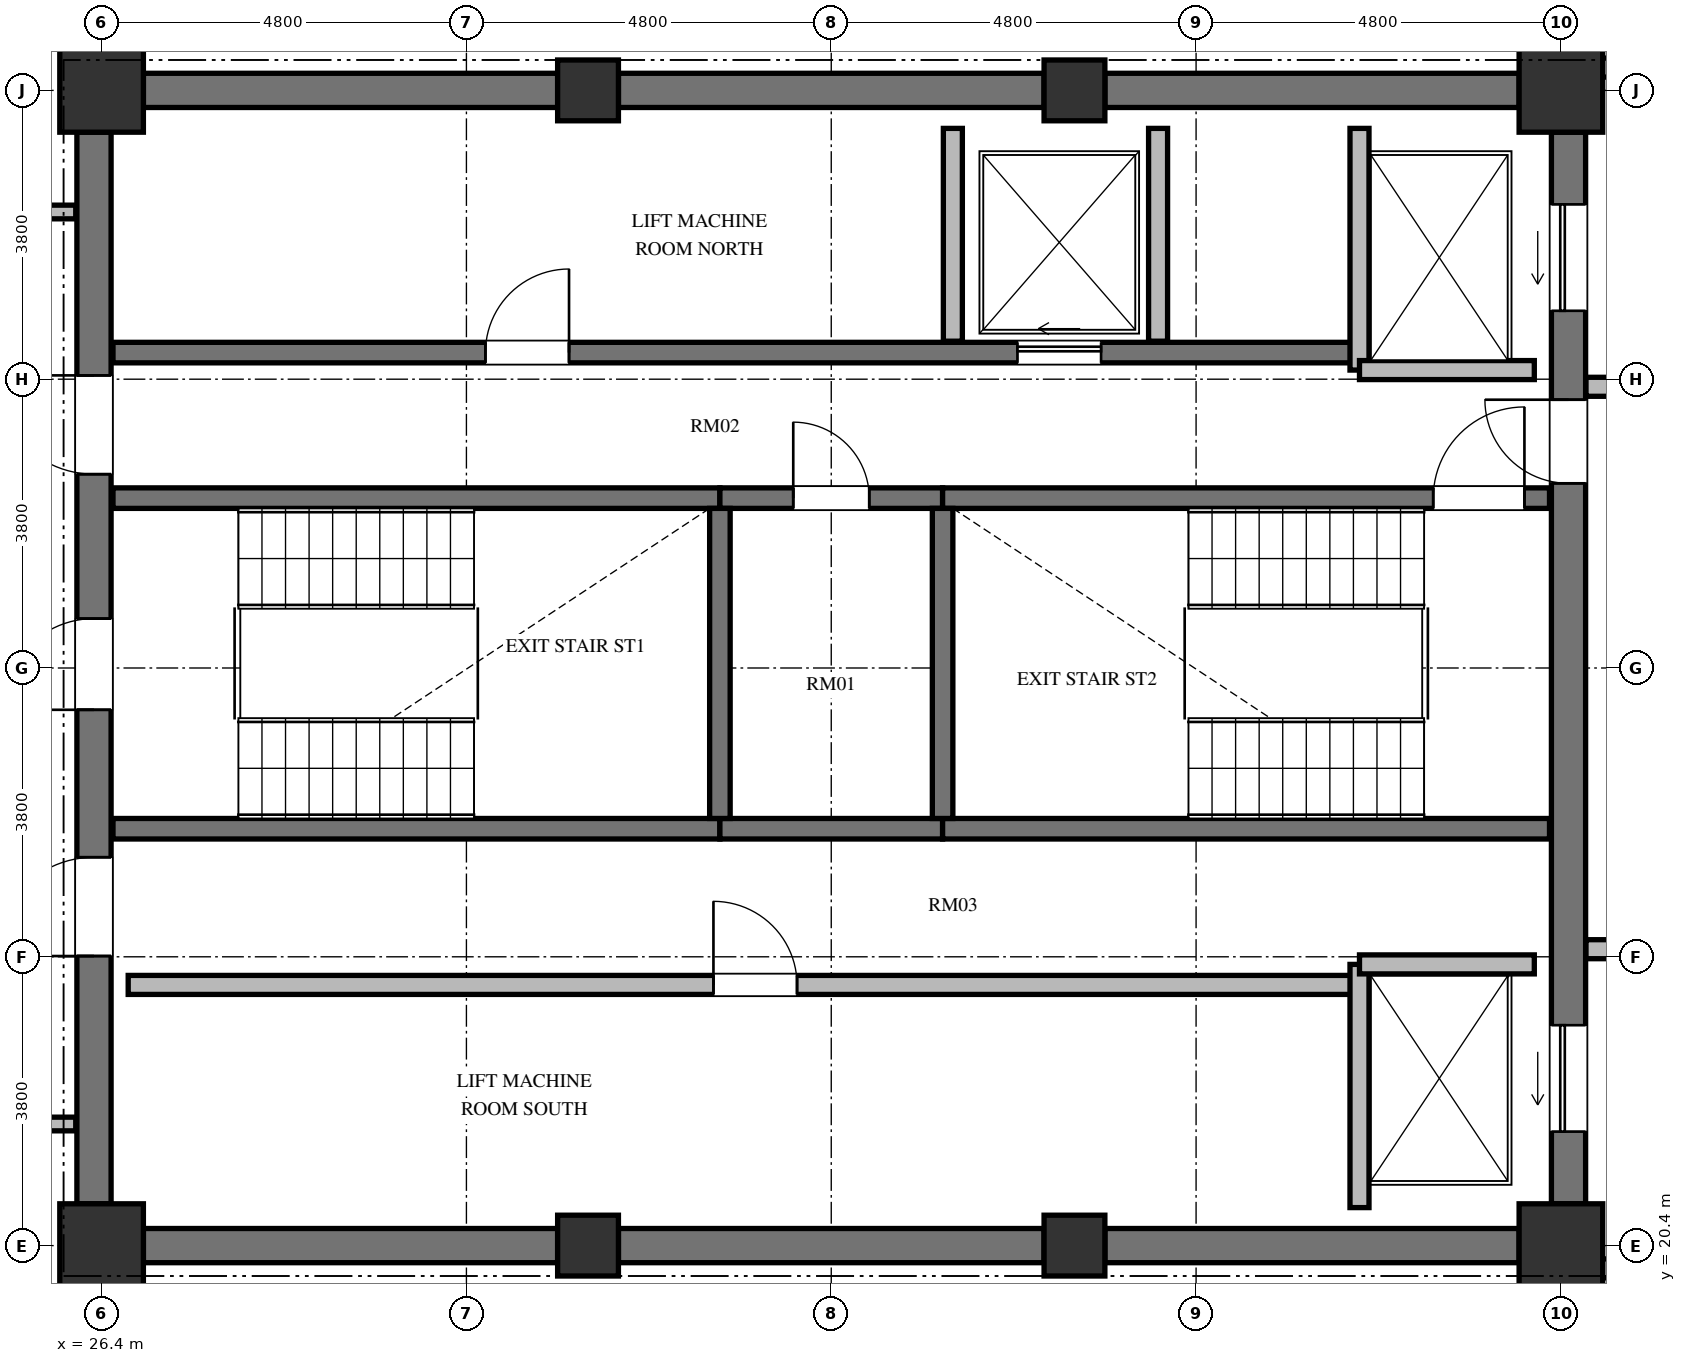
"""IFC4 building model, lengths in metres.
Left out: names, types, materials, properties, quantities, classifications, styles, units other than length and angle.
Written with IfcOpenShell. Run it as: python <this file> out.ifc"""

import sys

from ifc_helpers import new_model, si_unit, direction, frame, frame_2d, origin, origin_2d, place, context, subcontext, project, spatial, rectangle, extrude, element, fill, save


model = new_model("IFC4")
c1 = context("Model", 3, precision=1e-05, world=origin(), true_north=direction((0.0, 1.0)))
c2 = subcontext(c1, "Body", "Model", "MODEL_VIEW")
j1 = project(units=[si_unit("LENGTHUNIT", "METRE"), si_unit("PLANEANGLEUNIT", "RADIAN")], contexts=[c1])
p1 = place(None, origin())
s1 = spatial("IfcSite", under=j1, at=p1, CompositionType="ELEMENT")
p2 = place(p1, origin())
s2 = spatial("IfcBuilding", under=s1, at=p2, CompositionType="ELEMENT")
p3 = place(p2, frame((0.0, 0.0, 309.224)))
s3 = spatial("IfcBuildingStorey", under=s2, at=p3, CompositionType="ELEMENT", Elevation=309.224)
p4 = place(p3, frame((26.4, 20.4, 0.0), z_axis=(0.0, 0.0, 1.0), x_axis=(1.0, 0.0, 0.0)))
e1 = element("IfcColumn", 1, at=p4, inside=s3, PredefinedType="COLUMN", context=c2, shape_type="SweptSolid", body=[
    extrude(rectangle(XDim=1.1, YDim=1.1, at=origin_2d()), origin(), (0.0, 0.0, 1.0), 3.388),
])
for number, where, z_axis, x_axis in (
    (2, (32.8, 20.4, 0.0), (0.0, 0.0, 1.0), (1.0, 0.0, 0.0)),
    (3, (39.2, 20.4, 0.0), (0.0, 0.0, 1.0), (1.0, 0.0, 0.0)),
):
    element("IfcColumn", number, at=place(p3, frame(where, z_axis=z_axis, x_axis=x_axis)), inside=s3, PredefinedType="COLUMN", context=c2, shape_type="SweptSolid", body=[
        extrude(rectangle(XDim=0.8, YDim=0.8, at=origin_2d()), origin(), (0.0, 0.0, 1.0), 3.388),
    ])
for number, where, z_axis, x_axis in (
    (4, (45.6, 20.4, 0.0), (0.0, 0.0, 1.0), (1.0, 0.0, 0.0)),
    (5, (45.6, 35.6, 0.0), (0.0, 0.0, 1.0), (1.0, 0.0, 0.0)),
):
    element("IfcColumn", number, at=place(p3, frame(where, z_axis=z_axis, x_axis=x_axis)), inside=s3, PredefinedType="COLUMN", context=c2, shape_type="SweptSolid", body=[
        extrude(rectangle(XDim=1.1, YDim=1.1, at=origin_2d()), origin(), (0.0, 0.0, 1.0), 3.388),
    ])
for number, where, z_axis, x_axis in (
    (6, (39.2, 35.6, 0.0), (0.0, 0.0, 1.0), (1.0, 0.0, 0.0)),
    (7, (32.8, 35.6, 0.0), (0.0, 0.0, 1.0), (1.0, 0.0, 0.0)),
):
    element("IfcColumn", number, at=place(p3, frame(where, z_axis=z_axis, x_axis=x_axis)), inside=s3, PredefinedType="COLUMN", context=c2, shape_type="SweptSolid", body=[
        extrude(rectangle(XDim=0.8, YDim=0.8, at=origin_2d()), origin(), (0.0, 0.0, 1.0), 3.388),
    ])
p5 = place(p3, frame((26.4, 35.6, 0.0), z_axis=(0.0, 0.0, 1.0), x_axis=(1.0, 0.0, 0.0)))
e8 = element("IfcColumn", 8, at=p5, inside=s3, PredefinedType="COLUMN", context=c2, shape_type="SweptSolid", body=[
    extrude(rectangle(XDim=1.1, YDim=1.1, at=origin_2d()), origin(), (0.0, 0.0, 1.0), 3.388),
])
p6 = place(p3, frame((26.3, 20.95, 0.0), z_axis=(0.0, 0.0, 1.0), x_axis=(0.0, 1.0, 0.0)))
e9 = element("IfcWall", 9, at=p6, inside=s3, PredefinedType="SHEAR", context=c2, shape_type="SweptSolid", body=[
    extrude(rectangle(XDim=14.1, YDim=0.45, at=frame_2d((7.05, 0.0))), origin(), (0.0, 0.0, 1.0), 3.388),
])
p7 = place(p6, frame((6.5, 0.0, 0.0)))
e10 = element("IfcOpeningElement", 10, at=p7, cuts=e9, PredefinedType="OPENING", context=c2, shape_type="SweptSolid", body=[
    extrude(rectangle(XDim=1.2, YDim=2.15, at=frame_2d((0.6, 1.075))), frame((0.0, 0.235, 0.0), z_axis=(0.0, -1.0, 0.0), x_axis=(1.0, 0.0, 0.0)), (0.0, 0.0, 1.0), 0.47),
])
p8 = place(p6, frame((9.6, 0.0, 0.0)))
e11 = element("IfcOpeningElement", 11, at=p8, cuts=e9, PredefinedType="OPENING", context=c2, shape_type="SweptSolid", body=[
    extrude(rectangle(XDim=1.3, YDim=2.2, at=frame_2d((0.65, 1.1))), frame((0.0, 0.235, 0.0), z_axis=(0.0, -1.0, 0.0), x_axis=(1.0, 0.0, 0.0)), (0.0, 0.0, 1.0), 0.47),
])
p9 = place(p6, frame((3.26, 0.0, 0.0)))
e12 = element("IfcOpeningElement", 12, at=p9, cuts=e9, PredefinedType="OPENING", context=c2, shape_type="SweptSolid", body=[
    extrude(rectangle(XDim=1.3, YDim=2.2, at=frame_2d((0.65, 1.1))), frame((0.0, 0.235, 0.0), z_axis=(0.0, -1.0, 0.0), x_axis=(1.0, 0.0, 0.0)), (0.0, 0.0, 1.0), 0.47),
])
p10 = place(p3, frame((45.7, 20.95, 0.0), z_axis=(0.0, 0.0, 1.0), x_axis=(0.0, 1.0, 0.0)))
e13 = element("IfcWall", 13, at=p10, inside=s3, PredefinedType="SHEAR", context=c2, shape_type="SweptSolid", body=[
    extrude(rectangle(XDim=14.1, YDim=0.45, at=frame_2d((7.05, 0.0))), origin(), (0.0, 0.0, 1.0), 3.388),
])
p11 = place(p10, frame((11.75, 0.0, 0.0)))
e14 = element("IfcOpeningElement", 14, at=p11, cuts=e13, PredefinedType="OPENING", context=c2, shape_type="SweptSolid", body=[
    extrude(rectangle(XDim=1.4, YDim=2.3, at=frame_2d((0.7, 1.15))), frame((0.0, 0.235, 0.0), z_axis=(0.0, -1.0, 0.0), x_axis=(1.0, 0.0, 0.0)), (0.0, 0.0, 1.0), 0.47),
])
p12 = place(p10, frame((0.95, 0.0, 0.0)))
e15 = element("IfcOpeningElement", 15, at=p12, cuts=e13, PredefinedType="OPENING", context=c2, shape_type="SweptSolid", body=[
    extrude(rectangle(XDim=1.4, YDim=2.3, at=frame_2d((0.7, 1.15))), frame((0.0, 0.235, 0.0), z_axis=(0.0, -1.0, 0.0), x_axis=(1.0, 0.0, 0.0)), (0.0, 0.0, 1.0), 0.47),
])
p13 = place(p10, frame((9.48, 0.0, 0.0)))
e16 = element("IfcOpeningElement", 16, at=p13, cuts=e13, PredefinedType="OPENING", context=c2, shape_type="SweptSolid", body=[
    extrude(rectangle(XDim=1.1, YDim=2.15, at=frame_2d((0.55, 1.075))), frame((0.0, 0.235, 0.0), z_axis=(0.0, -1.0, 0.0), x_axis=(1.0, 0.0, 0.0)), (0.0, 0.0, 1.0), 0.47),
])
for number, where, z_axis, x_axis in (
    (17, (26.95, 20.4, 0.0), (0.0, 0.0, 1.0), (1.0, 0.0, 0.0)),
    (18, (26.95, 35.6, 0.0), (0.0, 0.0, 1.0), (1.0, 0.0, 0.0)),
):
    element("IfcWall", number, at=place(p3, frame(where, z_axis=z_axis, x_axis=x_axis)), inside=s3, PredefinedType="SHEAR", context=c2, shape_type="SweptSolid", body=[
        extrude(rectangle(XDim=5.45, YDim=0.45, at=frame_2d((2.725, 0.0))), origin(), (0.0, 0.0, 1.0), 3.388),
    ])
for number, where, z_axis, x_axis in (
    (19, (33.2, 20.4, 0.0), (0.0, 0.0, 1.0), (1.0, 0.0, 0.0)),
    (20, (33.2, 35.6, 0.0), (0.0, 0.0, 1.0), (1.0, 0.0, 0.0)),
):
    element("IfcWall", number, at=place(p3, frame(where, z_axis=z_axis, x_axis=x_axis)), inside=s3, PredefinedType="SHEAR", context=c2, shape_type="SweptSolid", body=[
        extrude(rectangle(XDim=5.6, YDim=0.45, at=frame_2d((2.8, 0.0))), origin(), (0.0, 0.0, 1.0), 3.388),
    ])
for number, where, z_axis, x_axis in (
    (21, (39.6, 20.4, 0.0), (0.0, 0.0, 1.0), (1.0, 0.0, 0.0)),
    (22, (39.6, 35.6, 0.0), (0.0, 0.0, 1.0), (1.0, 0.0, 0.0)),
):
    element("IfcWall", number, at=place(p3, frame(where, z_axis=z_axis, x_axis=x_axis)), inside=s3, PredefinedType="SHEAR", context=c2, shape_type="SweptSolid", body=[
        extrude(rectangle(XDim=5.45, YDim=0.45, at=frame_2d((2.725, 0.0))), origin(), (0.0, 0.0, 1.0), 3.388),
    ])
p14 = place(p3, frame((26.55, 30.235, 0.0), z_axis=(0.0, 0.0, 1.0), x_axis=(1.0, 0.0, 0.0)))
e23 = element("IfcWall", 23, at=p14, inside=s3, PredefinedType="SHEAR", context=c2, shape_type="SweptSolid", body=[
    extrude(rectangle(XDim=7.985, YDim=0.27, at=frame_2d((3.992, 0.0))), origin(), (0.0, 0.0, 1.0), 3.388),
])
p15 = place(p3, frame((34.535, 30.235, 0.0), z_axis=(0.0, 0.0, 1.0), x_axis=(1.0, 0.0, 0.0)))
e24 = element("IfcWall", 24, at=p15, inside=s3, PredefinedType="SHEAR", context=c2, shape_type="SweptSolid", body=[
    extrude(rectangle(XDim=2.93, YDim=0.27, at=frame_2d((1.465, 0.0))), origin(), (0.0, 0.0, 1.0), 3.388),
])
p16 = place(p15, frame((0.965, 0.0, 0.0)))
e25 = element("IfcOpeningElement", 25, at=p16, cuts=e24, PredefinedType="OPENING", context=c2, shape_type="SweptSolid", body=[
    extrude(rectangle(XDim=1.0, YDim=2.1, at=frame_2d((0.5, 1.05))), frame((0.0, 0.145, 0.0), z_axis=(0.0, -1.0, 0.0), x_axis=(1.0, 0.0, 0.0)), (0.0, 0.0, 1.0), 0.29),
])
p17 = place(p3, frame((37.465, 30.235, 0.0), z_axis=(0.0, 0.0, 1.0), x_axis=(1.0, 0.0, 0.0)))
e26 = element("IfcWall", 26, at=p17, inside=s3, PredefinedType="SHEAR", context=c2, shape_type="SweptSolid", body=[
    extrude(rectangle(XDim=7.985, YDim=0.27, at=frame_2d((3.992, 0.0))), origin(), (0.0, 0.0, 1.0), 3.388),
])
p18 = place(p17, frame((6.455, 0.0, 0.0)))
e27 = element("IfcOpeningElement", 27, at=p18, cuts=e26, PredefinedType="OPENING", context=c2, shape_type="SweptSolid", body=[
    extrude(rectangle(XDim=1.2, YDim=2.15, at=frame_2d((0.6, 1.075))), frame((0.0, 0.145, 0.0), z_axis=(0.0, -1.0, 0.0), x_axis=(1.0, 0.0, 0.0)), (0.0, 0.0, 1.0), 0.29),
])
p19 = place(p3, frame((26.55, 25.885, 0.0), z_axis=(0.0, 0.0, 1.0), x_axis=(1.0, 0.0, 0.0)))
e28 = element("IfcWall", 28, at=p19, inside=s3, PredefinedType="SHEAR", context=c2, shape_type="SweptSolid", body=[
    extrude(rectangle(XDim=7.985, YDim=0.27, at=frame_2d((3.992, 0.0))), origin(), (0.0, 0.0, 1.0), 3.388),
])
p20 = place(p3, frame((34.535, 25.885, 0.0), z_axis=(0.0, 0.0, 1.0), x_axis=(1.0, 0.0, 0.0)))
e29 = element("IfcWall", 29, at=p20, inside=s3, PredefinedType="SHEAR", context=c2, shape_type="SweptSolid", body=[
    extrude(rectangle(XDim=2.93, YDim=0.27, at=frame_2d((1.465, 0.0))), origin(), (0.0, 0.0, 1.0), 3.388),
])
p21 = place(p3, frame((37.465, 25.885, 0.0), z_axis=(0.0, 0.0, 1.0), x_axis=(1.0, 0.0, 0.0)))
e30 = element("IfcWall", 30, at=p21, inside=s3, PredefinedType="SHEAR", context=c2, shape_type="SweptSolid", body=[
    extrude(rectangle(XDim=7.985, YDim=0.27, at=frame_2d((3.992, 0.0))), origin(), (0.0, 0.0, 1.0), 3.388),
])
for number, where, z_axis, x_axis in (
    (31, (34.535, 26.02, 0.0), (0.0, 0.0, 1.0), (0.0, 1.0, 0.0)),
    (32, (37.465, 26.02, 0.0), (0.0, 0.0, 1.0), (0.0, 1.0, 0.0)),
):
    element("IfcWall", number, at=place(p3, frame(where, z_axis=z_axis, x_axis=x_axis)), inside=s3, PredefinedType="SHEAR", context=c2, shape_type="SweptSolid", body=[
        extrude(rectangle(XDim=4.08, YDim=0.27, at=frame_2d((2.04, 0.0))), origin(), (0.0, 0.0, 1.0), 3.388),
    ])
p22 = place(p3, frame((26.55, 32.15, 0.0), z_axis=(0.0, 0.0, 1.0), x_axis=(1.0, 0.0, 0.0)))
e33 = element("IfcWall", 33, at=p22, inside=s3, PredefinedType="SHEAR", context=c2, shape_type="SweptSolid", body=[
    extrude(rectangle(XDim=16.4, YDim=0.27, at=frame_2d((8.2, 0.0))), origin(), (0.0, 0.0, 1.0), 3.388),
])
p23 = place(p22, frame((4.9, 0.0, 0.0)))
e34 = element("IfcOpeningElement", 34, at=p23, cuts=e33, PredefinedType="OPENING", context=c2, shape_type="SweptSolid", body=[
    extrude(rectangle(XDim=1.1, YDim=2.15, at=frame_2d((0.55, 1.075))), frame((0.0, 0.145, 0.0), z_axis=(0.0, -1.0, 0.0), x_axis=(1.0, 0.0, 0.0)), (0.0, 0.0, 1.0), 0.29),
])
p24 = place(p22, frame((11.9, 0.0, 0.0)))
e35 = element("IfcOpeningElement", 35, at=p24, cuts=e33, PredefinedType="OPENING", context=c2, shape_type="SweptSolid", body=[
    extrude(rectangle(XDim=1.1, YDim=2.2, at=frame_2d((0.55, 1.1))), frame((0.0, 0.145, 0.0), z_axis=(0.0, -1.0, 0.0), x_axis=(1.0, 0.0, 0.0)), (0.0, 0.0, 1.0), 0.29),
])
p25 = place(p3, frame((26.75, 23.83, 0.0), z_axis=(0.0, 0.0, 1.0), x_axis=(1.0, 0.0, 0.0)))
e36 = element("IfcWall", 36, at=p25, inside=s3, PredefinedType="SOLIDWALL", context=c2, shape_type="SweptSolid", body=[
    extrude(rectangle(XDim=16.2, YDim=0.25, at=frame_2d((8.1, 0.0))), origin(), (0.0, 0.0, 1.0), 3.068),
])
p26 = place(p25, frame((7.7, 0.0, 0.0)))
e37 = element("IfcOpeningElement", 37, at=p26, cuts=e36, PredefinedType="OPENING", context=c2, shape_type="SweptSolid", body=[
    extrude(rectangle(XDim=1.1, YDim=2.15, at=frame_2d((0.55, 1.075))), frame((0.0, 0.135, 0.0), z_axis=(0.0, -1.0, 0.0), x_axis=(1.0, 0.0, 0.0)), (0.0, 0.0, 1.0), 0.27),
])
p27 = place(p3, frame((42.95, 31.92, 0.0), z_axis=(0.0, 0.0, 1.0), x_axis=(0.0, 1.0, 0.0)))
e38 = element("IfcWall", 38, at=p27, inside=s3, PredefinedType="SOLIDWALL", context=c2, shape_type="SweptSolid", body=[
    extrude(rectangle(XDim=3.18, YDim=0.25, at=frame_2d((1.59, 0.0))), origin(), (0.0, 0.0, 1.0), 3.068),
])
p28 = place(p3, frame((42.95, 31.92, 0.0), z_axis=(0.0, 0.0, 1.0), x_axis=(1.0, 0.0, 0.0)))
e39 = element("IfcWall", 39, at=p28, inside=s3, PredefinedType="SOLIDWALL", context=c2, shape_type="SweptSolid", body=[
    extrude(rectangle(XDim=2.3, YDim=0.25, at=frame_2d((1.15, 0.0))), origin(), (0.0, 0.0, 1.0), 3.068),
])
p29 = place(p3, frame((42.95, 20.9, 0.0), z_axis=(0.0, 0.0, 1.0), x_axis=(0.0, 1.0, 0.0)))
e40 = element("IfcWall", 40, at=p29, inside=s3, PredefinedType="SOLIDWALL", context=c2, shape_type="SweptSolid", body=[
    extrude(rectangle(XDim=3.2, YDim=0.25, at=frame_2d((1.6, 0.0))), origin(), (0.0, 0.0, 1.0), 3.068),
])
p30 = place(p3, frame((42.95, 24.1, 0.0), z_axis=(0.0, 0.0, 1.0), x_axis=(1.0, 0.0, 0.0)))
e41 = element("IfcWall", 41, at=p30, inside=s3, PredefinedType="SOLIDWALL", context=c2, shape_type="SweptSolid", body=[
    extrude(rectangle(XDim=2.3, YDim=0.25, at=frame_2d((1.15, 0.0))), origin(), (0.0, 0.0, 1.0), 3.068),
])
for number, where, z_axis, x_axis in (
    (42, (37.6, 32.3, 0.0), (0.0, 0.0, 1.0), (0.0, 1.0, 0.0)),
    (43, (40.3, 32.3, 0.0), (0.0, 0.0, 1.0), (0.0, 1.0, 0.0)),
):
    element("IfcWall", number, at=place(p3, frame(where, z_axis=z_axis, x_axis=x_axis)), inside=s3, PredefinedType="SOLIDWALL", context=c2, shape_type="SweptSolid", body=[
        extrude(rectangle(XDim=2.8, YDim=0.25, at=frame_2d((1.4, 0.0))), origin(), (0.0, 0.0, 1.0), 3.068),
    ])
for number, where, z_axis, x_axis in (
    (44, (45.93, 35.9, 0.0), (0.0, 0.0, 1.0), (1.0, 0.0, 0.0)),
    (45, (45.93, 31.7, 0.0), (0.0, 0.0, 1.0), (1.0, 0.0, 0.0)),
    (46, (45.93, 24.3, 0.0), (0.0, 0.0, 1.0), (1.0, 0.0, 0.0)),
    (47, (45.93, 20.1, 0.0), (0.0, 0.0, 1.0), (1.0, 0.0, 0.0)),
):
    element("IfcWall", number, at=place(p3, frame(where, z_axis=z_axis, x_axis=x_axis)), inside=s3, PredefinedType="SOLIDWALL", context=c2, shape_type="SweptSolid", body=[
        extrude(rectangle(XDim=2.52, YDim=0.25, at=frame_2d((1.26, 0.0))), origin(), (0.0, 0.0, 1.0), 3.068),
    ])
for number, where, z_axis, x_axis in (
    (48, (26.06, 22.0, 0.0), (0.0, 0.0, 1.0), (-1.0, 0.0, 0.0)),
    (49, (23.614, 34.0, 0.0), (0.0, 0.0, 1.0), (1.0, 0.0, 0.0)),
):
    element("IfcWall", number, at=place(p3, frame(where, z_axis=z_axis, x_axis=x_axis)), inside=s3, PredefinedType="PARTITIONING", context=c2, shape_type="SweptSolid", body=[
        extrude(rectangle(XDim=2.447, YDim=0.18, at=frame_2d((1.223, 0.0))), origin(), (0.0, 0.0, 1.0), 3.068),
    ])
p31 = place(p7, origin())
e50 = element("IfcDoor", 50, at=p31, inside=s3, OperationType="SINGLE_SWING_LEFT", PredefinedType="DOOR", context=c2, shape_type="SweptSolid", body=[
    extrude(rectangle(XDim=1.2, YDim=2.15, at=frame_2d((0.6, 1.075))), frame((0.0, 0.025, 0.0), z_axis=(0.0, -1.0, 0.0), x_axis=(1.0, 0.0, 0.0)), (0.0, 0.0, 1.0), 0.05),
])
fill(e10, e50)
p32 = place(p18, origin())
e51 = element("IfcDoor", 51, at=p32, inside=s3, OperationType="SINGLE_SWING_RIGHT", PredefinedType="DOOR", context=c2, shape_type="SweptSolid", body=[
    extrude(rectangle(XDim=1.2, YDim=2.15, at=frame_2d((0.6, 1.075))), frame((0.0, 0.025, 0.0), z_axis=(0.0, -1.0, 0.0), x_axis=(1.0, 0.0, 0.0)), (0.0, 0.0, 1.0), 0.05),
])
fill(e27, e51)
p33 = place(p16, origin())
e52 = element("IfcDoor", 52, at=p33, inside=s3, OperationType="SINGLE_SWING_LEFT", PredefinedType="DOOR", context=c2, shape_type="SweptSolid", body=[
    extrude(rectangle(XDim=1.0, YDim=2.1, at=frame_2d((0.5, 1.05))), frame((0.0, 0.025, 0.0), z_axis=(0.0, -1.0, 0.0), x_axis=(1.0, 0.0, 0.0)), (0.0, 0.0, 1.0), 0.05),
])
fill(e25, e52)
p34 = place(p8, origin())
e53 = element("IfcDoor", 53, at=p34, inside=s3, OperationType="SINGLE_SWING_RIGHT", PredefinedType="DOOR", context=c2, shape_type="SweptSolid", body=[
    extrude(rectangle(XDim=1.3, YDim=2.2, at=frame_2d((0.65, 1.1))), frame((0.0, 0.025, 0.0), z_axis=(0.0, -1.0, 0.0), x_axis=(1.0, 0.0, 0.0)), (0.0, 0.0, 1.0), 0.05),
])
fill(e11, e53)
p35 = place(p9, origin())
e54 = element("IfcDoor", 54, at=p35, inside=s3, OperationType="SINGLE_SWING_LEFT", PredefinedType="DOOR", context=c2, shape_type="SweptSolid", body=[
    extrude(rectangle(XDim=1.3, YDim=2.2, at=frame_2d((0.65, 1.1))), frame((0.0, 0.025, 0.0), z_axis=(0.0, -1.0, 0.0), x_axis=(1.0, 0.0, 0.0)), (0.0, 0.0, 1.0), 0.05),
])
fill(e12, e54)
p36 = place(p23, origin())
e55 = element("IfcDoor", 55, at=p36, inside=s3, OperationType="SINGLE_SWING_RIGHT", PredefinedType="DOOR", context=c2, shape_type="SweptSolid", body=[
    extrude(rectangle(XDim=1.1, YDim=2.15, at=frame_2d((0.55, 1.075))), frame((0.0, 0.025, 0.0), z_axis=(0.0, -1.0, 0.0), x_axis=(1.0, 0.0, 0.0)), (0.0, 0.0, 1.0), 0.05),
])
fill(e34, e55)
p37 = place(p26, origin())
e56 = element("IfcDoor", 56, at=p37, inside=s3, OperationType="SINGLE_SWING_LEFT", PredefinedType="DOOR", context=c2, shape_type="SweptSolid", body=[
    extrude(rectangle(XDim=1.1, YDim=2.15, at=frame_2d((0.55, 1.075))), frame((0.0, 0.025, 0.0), z_axis=(0.0, -1.0, 0.0), x_axis=(1.0, 0.0, 0.0)), (0.0, 0.0, 1.0), 0.05),
])
fill(e37, e56)
p38 = place(p24, origin())
e57 = element("IfcDoor", 57, at=p38, inside=s3, OperationType="SLIDING_TO_LEFT", PredefinedType="DOOR", context=c2, shape_type="SweptSolid", body=[
    extrude(rectangle(XDim=1.1, YDim=2.2, at=frame_2d((0.55, 1.1))), frame((0.0, 0.025, 0.0), z_axis=(0.0, -1.0, 0.0), x_axis=(1.0, 0.0, 0.0)), (0.0, 0.0, 1.0), 0.05),
])
fill(e35, e57)
p39 = place(p11, origin())
e58 = element("IfcDoor", 58, at=p39, inside=s3, OperationType="SLIDING_TO_LEFT", PredefinedType="DOOR", context=c2, shape_type="SweptSolid", body=[
    extrude(rectangle(XDim=1.4, YDim=2.3, at=frame_2d((0.7, 1.15))), frame((0.0, 0.025, 0.0), z_axis=(0.0, -1.0, 0.0), x_axis=(1.0, 0.0, 0.0)), (0.0, 0.0, 1.0), 0.05),
])
fill(e14, e58)
p40 = place(p12, origin())
e59 = element("IfcDoor", 59, at=p40, inside=s3, OperationType="SLIDING_TO_LEFT", PredefinedType="DOOR", context=c2, shape_type="SweptSolid", body=[
    extrude(rectangle(XDim=1.4, YDim=2.3, at=frame_2d((0.7, 1.15))), frame((0.0, 0.025, 0.0), z_axis=(0.0, -1.0, 0.0), x_axis=(1.0, 0.0, 0.0)), (0.0, 0.0, 1.0), 0.05),
])
fill(e15, e59)
p41 = place(p13, origin())
e60 = element("IfcDoor", 60, at=p41, inside=s3, OperationType="SINGLE_SWING_RIGHT", PredefinedType="DOOR", context=c2, shape_type="SweptSolid", body=[
    extrude(rectangle(XDim=1.1, YDim=2.15, at=frame_2d((0.55, 1.075))), frame((0.0, 0.025, 0.0), z_axis=(0.0, -1.0, 0.0), x_axis=(1.0, 0.0, 0.0)), (0.0, 0.0, 1.0), 0.05),
])
fill(e16, e60)
save(model, sys.argv[1])
